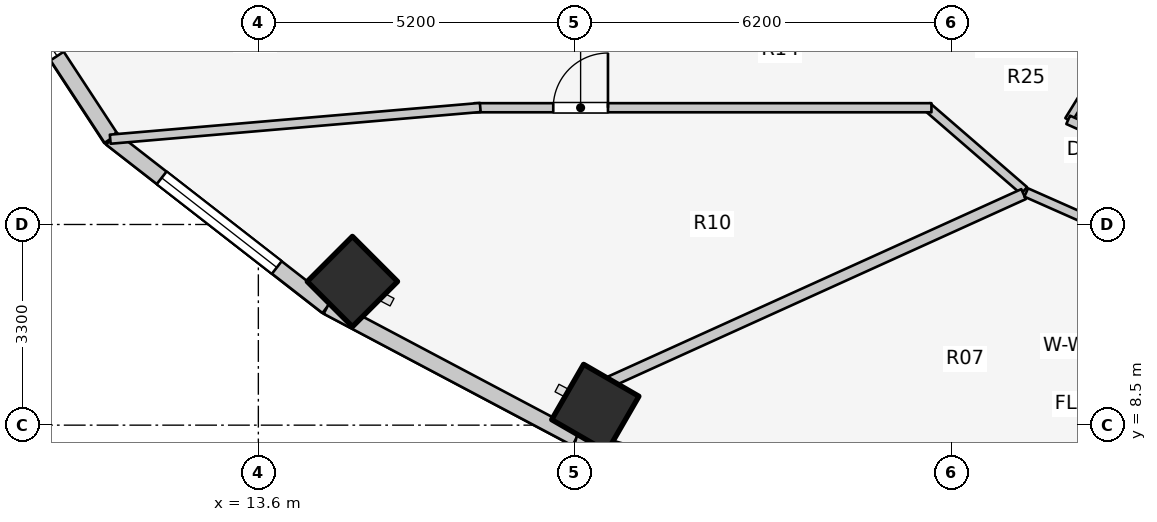
"""IFC4 building model, lengths in metres.
Left out: names, types, materials, properties, quantities, classifications, styles, units other than length and angle.
Written with IfcOpenShell. Run it as: python <this file> out.ifc"""

import sys

from ifc_helpers import new_model, si_unit, direction, frame, frame_2d, origin, origin_2d, place, context, subcontext, project, spatial, rectangle, extrude, element, fill, save


model = new_model("IFC4")
c1 = context("Model", 3, precision=1e-05, world=origin(), true_north=direction((0.0, 1.0)))
c2 = subcontext(c1, "Body", "Model", "MODEL_VIEW")
j1 = project(units=[si_unit("LENGTHUNIT", "METRE"), si_unit("PLANEANGLEUNIT", "RADIAN")], contexts=[c1])
p1 = place(None, origin())
s1 = spatial("IfcSite", under=j1, at=p1, CompositionType="ELEMENT")
p2 = place(p1, origin())
s2 = spatial("IfcBuilding", under=s1, at=p2, CompositionType="ELEMENT")
p3 = place(p2, frame((0.0, 0.0, 113.5)))
s3 = spatial("IfcBuildingStorey", under=s2, at=p3, CompositionType="ELEMENT", Elevation=113.5)
for number, where, z_axis, x_axis in (
    (1, (15.147, 10.862, 0.0), (0.0, 0.0, 1.0), (-0.707, -0.707, 0.0)),
    (2, (19.142, 8.782, 0.0), (0.0, 0.0, 1.0), (-0.5, -0.866, 0.0)),
):
    element("IfcColumn", number, at=place(p3, frame(where, z_axis=z_axis, x_axis=x_axis)), inside=s3, PredefinedType="COLUMN", context=c2, shape_type="SweptSolid", body=[
        extrude(rectangle(XDim=1.05, YDim=1.05, at=origin_2d()), origin(), (0.0, 0.0, 1.0), 3.1),
    ])
p4 = place(p3, frame((8.578, 17.181, 0.0), z_axis=(0.0, 0.0, 1.0), x_axis=(0.548283220945, -0.836292717672, 0.0)))
e3 = element("IfcWall", 3, at=p4, inside=s3, PredefinedType="STANDARD", context=c2, shape_type="SweptSolid", body=[
    extrude(rectangle(XDim=4.744, YDim=0.26, at=frame_2d((2.372, 0.0))), origin(), (0.0, 0.0, 1.0), 2.85),
])
p5 = place(p4, frame((1.622, 0.0, 0.75)))
e4 = element("IfcOpeningElement", 4, at=p5, cuts=e3, PredefinedType="OPENING", context=c2, shape_type="SweptSolid", body=[
    extrude(rectangle(XDim=1.5, YDim=1.6, at=frame_2d((0.75, 0.8))), frame((0.0, 0.14, 0.0), z_axis=(0.0, -1.0, 0.0), x_axis=(1.0, 0.0, 0.0)), (0.0, 0.0, 1.0), 0.28),
])
p6 = place(p3, frame((11.179, 13.214, 0.0), z_axis=(0.0, 0.0, 1.0), x_axis=(0.789127449954, -0.614229491094, 0.0)))
e5 = element("IfcWall", 5, at=p6, inside=s3, PredefinedType="STANDARD", context=c2, shape_type="SweptSolid", body=[
    extrude(rectangle(XDim=4.505, YDim=0.26, at=frame_2d((2.252, 0.0))), origin(), (0.0, 0.0, 1.0), 2.85),
])
p7 = place(p6, frame((1.052, 0.0, 0.75)))
e6 = element("IfcOpeningElement", 6, at=p7, cuts=e5, PredefinedType="OPENING", context=c2, shape_type="SweptSolid", body=[
    extrude(rectangle(XDim=2.4, YDim=1.7, at=frame_2d((1.2, 0.85))), frame((0.0, 0.14, 0.0), z_axis=(0.0, -1.0, 0.0), x_axis=(1.0, 0.0, 0.0)), (0.0, 0.0, 1.0), 0.28),
])
p8 = place(p3, frame((14.734, 10.447, 0.0), z_axis=(0.0, 0.0, 1.0), x_axis=(0.883668636807, -0.4681129568, 0.0)))
e7 = element("IfcWall", 7, at=p8, inside=s3, PredefinedType="STANDARD", context=c2, shape_type="SweptSolid", body=[
    extrude(rectangle(XDim=4.631, YDim=0.26, at=frame_2d((2.316, 0.0))), origin(), (0.0, 0.0, 1.0), 2.85),
])
p9 = place(p3, frame((18.827, 8.279, 0.0), z_axis=(0.0, 0.0, 1.0), x_axis=(0.962938491413, -0.269721081407, 0.0)))
e8 = element("IfcWall", 8, at=p9, inside=s3, PredefinedType="STANDARD", context=c2, shape_type="SweptSolid", body=[
    extrude(rectangle(XDim=5.563, YDim=0.26, at=frame_2d((2.782, 0.0))), origin(), (0.0, 0.0, 1.0), 2.85),
])
p10 = place(p9, frame((2.031, 0.0, 0.75)))
e9 = element("IfcOpeningElement", 9, at=p10, cuts=e8, PredefinedType="OPENING", context=c2, shape_type="SweptSolid", body=[
    extrude(rectangle(XDim=1.5, YDim=1.6, at=frame_2d((0.75, 0.8))), frame((0.0, 0.14, 0.0), z_axis=(0.0, -1.0, 0.0), x_axis=(1.0, 0.0, 0.0)), (0.0, 0.0, 1.0), 0.28),
])
p11 = place(p3, frame((26.193, 12.358, 0.0), z_axis=(0.0, 0.0, 1.0), x_axis=(-0.756055312247, 0.654507727092, 0.0)))
e10 = element("IfcWall", 10, at=p11, inside=s3, PredefinedType="PARTITIONING", context=c2, shape_type="SweptSolid", body=[
    extrude(rectangle(XDim=2.111, YDim=0.15, at=frame_2d((1.055, 0.0))), origin(), (0.0, 0.0, 1.0), 2.272),
])
p12 = place(p3, frame((17.15, 13.72, 0.0), z_axis=(0.0, 0.0, 1.0), x_axis=(1.0, 0.0, 0.0)))
e11 = element("IfcWall", 11, at=p12, inside=s3, PredefinedType="PARTITIONING", context=c2, shape_type="SweptSolid", body=[
    extrude(rectangle(XDim=7.52, YDim=0.15, at=frame_2d((3.76, 0.0))), origin(), (0.0, 0.0, 1.0), 2.272),
])
p13 = place(p12, frame((1.3, 0.0, 0.0)))
e12 = element("IfcOpeningElement", 12, at=p13, cuts=e11, PredefinedType="OPENING", context=c2, shape_type="SweptSolid", body=[
    extrude(rectangle(XDim=0.9, YDim=2.1, at=frame_2d((0.45, 1.05))), frame((0.0, 0.085, 0.0), z_axis=(0.0, -1.0, 0.0), x_axis=(1.0, 0.0, 0.0)), (0.0, 0.0, 1.0), 0.17),
])
p14 = place(p3, frame((17.25, 13.724, 0.0), z_axis=(0.0, 0.0, 1.0), x_axis=(-0.996341886029, -0.085456691633, 0.0)))
e13 = element("IfcWall", 13, at=p14, inside=s3, PredefinedType="PARTITIONING", context=c2, shape_type="SweptSolid", body=[
    extrude(rectangle(XDim=6.108, YDim=0.15, at=frame_2d((3.054, 0.0))), origin(), (0.0, 0.0, 1.0), 2.142),
])
p15 = place(p3, frame((28.45, 15.985, 0.0), z_axis=(0.0, 0.0, 1.0), x_axis=(-0.525627246902, -0.850714991824, 0.0)))
e14 = element("IfcWall", 14, at=p15, inside=s3, PredefinedType="PARTITIONING", context=c2, shape_type="SweptSolid", body=[
    extrude(rectangle(XDim=2.901, YDim=0.125, at=frame_2d((1.451, 0.0))), origin(), (0.0, 0.0, 1.0), 2.272),
])
p16 = place(p3, frame((26.919, 13.521, 0.0), z_axis=(0.0, 0.0, 1.0), x_axis=(0.912888568324, -0.408208845842, 0.0)))
e15 = element("IfcWall", 15, at=p16, inside=s3, PredefinedType="PARTITIONING", context=c2, shape_type="SweptSolid", body=[
    extrude(rectangle(XDim=2.69, YDim=0.15, at=frame_2d((1.345, 0.0))), origin(), (0.0, 0.0, 1.0), 2.272),
])
p17 = place(p3, frame((26.185, 12.299, 0.0), z_axis=(0.0, 0.0, 1.0), x_axis=(-0.910720488346, -0.413023234342, 0.0)))
e16 = element("IfcWall", 16, at=p17, inside=s3, PredefinedType="PARTITIONING", context=c2, shape_type="SweptSolid", body=[
    extrude(rectangle(XDim=7.456, YDim=0.18, at=frame_2d((3.728, 0.0))), origin(), (0.0, 0.0, 1.0), 2.272),
])
p18 = place(p3, frame((26.228, 12.326, 0.0), z_axis=(0.0, 0.0, 1.0), x_axis=(0.914324470734, -0.404982422108, 0.0)))
e17 = element("IfcWall", 17, at=p18, inside=s3, PredefinedType="PARTITIONING", context=c2, shape_type="SweptSolid", body=[
    extrude(rectangle(XDim=3.058, YDim=0.15, at=frame_2d((1.529, 0.0))), origin(), (0.0, 0.0, 1.0), 2.272),
])
p19 = place(p18, frame((1.029, 0.0, 0.0)))
e18 = element("IfcOpeningElement", 18, at=p19, cuts=e17, PredefinedType="OPENING", context=c2, shape_type="SweptSolid", body=[
    extrude(rectangle(XDim=1.0, YDim=2.1, at=frame_2d((0.5, 1.05))), frame((0.0, 0.085, 0.0), z_axis=(0.0, -1.0, 0.0), x_axis=(1.0, 0.0, 0.0)), (0.0, 0.0, 1.0), 0.17),
])
p20 = place(p5, origin())
e19 = element("IfcWindow", 19, at=p20, inside=s3, PartitioningType="SINGLE_PANEL", PredefinedType="WINDOW", context=c2, shape_type="SweptSolid", body=[
    extrude(rectangle(XDim=1.5, YDim=1.6, at=frame_2d((0.75, 0.8))), frame((0.0, 0.03, 0.0), z_axis=(0.0, -1.0, 0.0), x_axis=(1.0, 0.0, 0.0)), (0.0, 0.0, 1.0), 0.06),
])
fill(e4, e19)
p21 = place(p7, origin())
e20 = element("IfcWindow", 20, at=p21, inside=s3, PartitioningType="SINGLE_PANEL", PredefinedType="WINDOW", context=c2, shape_type="SweptSolid", body=[
    extrude(rectangle(XDim=2.4, YDim=1.7, at=frame_2d((1.2, 0.85))), frame((0.0, 0.03, 0.0), z_axis=(0.0, -1.0, 0.0), x_axis=(1.0, 0.0, 0.0)), (0.0, 0.0, 1.0), 0.06),
])
fill(e6, e20)
p22 = place(p13, origin())
e21 = element("IfcDoor", 21, at=p22, inside=s3, OperationType="SINGLE_SWING_RIGHT", PredefinedType="DOOR", context=c2, shape_type="SweptSolid", body=[
    extrude(rectangle(XDim=0.9, YDim=2.1, at=frame_2d((0.45, 1.05))), frame((0.0, 0.025, 0.0), z_axis=(0.0, -1.0, 0.0), x_axis=(1.0, 0.0, 0.0)), (0.0, 0.0, 1.0), 0.05),
])
fill(e12, e21)
save(model, sys.argv[1])
